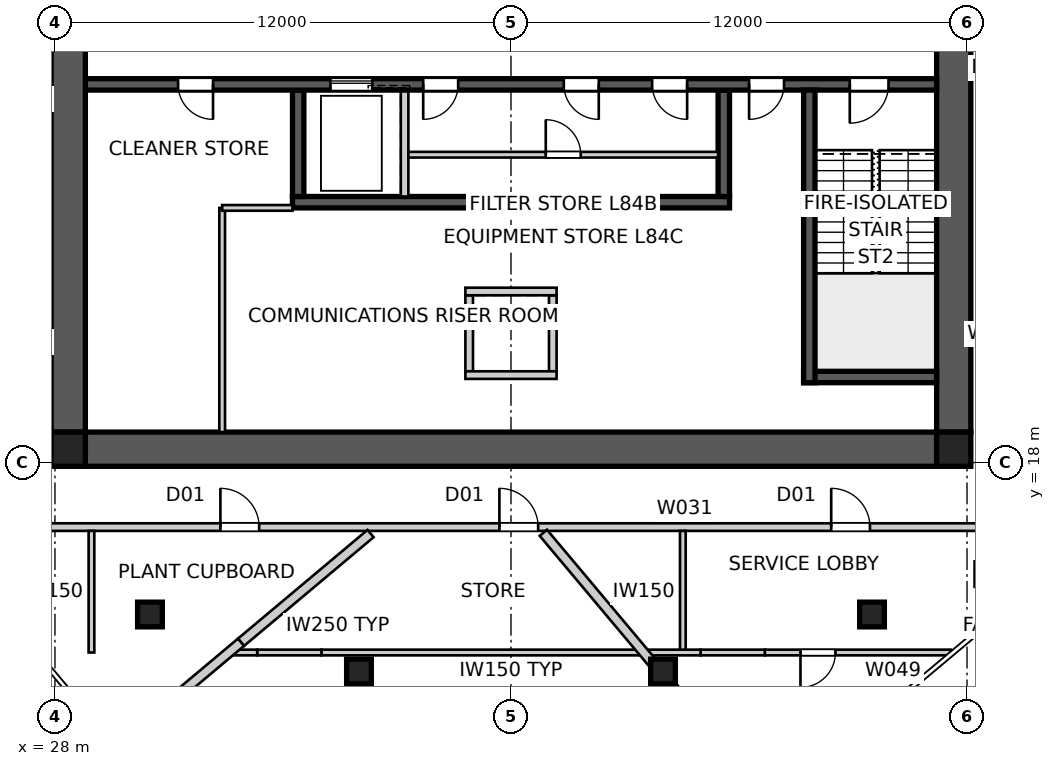
"""IFC4 building model, lengths in metres.
Left out: names, types, materials, properties, quantities, classifications, styles, units other than length and angle.
Written with IfcOpenShell. Run it as: python <this file> out.ifc"""

import sys

from ifc_helpers import new_model, si_unit, direction, frame, frame_2d, origin, origin_2d, place, context, subcontext, project, spatial, polyline, rectangle, outline, extrude, element, fill, save


model = new_model("IFC4")
c1 = context("Model", 3, precision=1e-05, world=origin(), true_north=direction((0.0, 1.0)))
c2 = subcontext(c1, "Body", "Model", "MODEL_VIEW")
j1 = project(units=[si_unit("LENGTHUNIT", "METRE"), si_unit("PLANEANGLEUNIT", "RADIAN")], contexts=[c1])
p1 = place(None, origin())
s1 = spatial("IfcSite", under=j1, at=p1, CompositionType="ELEMENT")
p2 = place(p1, origin())
s2 = spatial("IfcBuilding", under=s1, at=p2, CompositionType="ELEMENT")
p3 = place(p2, frame((0.0, 0.0, 304.3)))
s3 = spatial("IfcBuildingStorey", under=s2, at=p3, CompositionType="ELEMENT", Elevation=304.3)
p4 = place(p3, frame((51.2, 18.35, 0.0), z_axis=(0.0, 0.0, 1.0), x_axis=(-1.0, 0.0, 0.0)))
e1 = element("IfcWall", 1, at=p4, inside=s3, PredefinedType="SHEAR", context=c2, shape_type="SweptSolid", body=[
    extrude(outline(polyline([(0.0, -0.45), (22.4, -0.45), (22.4, -0.025), (22.85, -0.025), (22.85, 0.025), (22.4, 0.025), (22.4, 0.45), (0.0, 0.45), (0.0, 0.025), (-0.45, 0.025), (-0.45, -0.025), (0.0, -0.025), (0.0, -0.45)])), origin(), (0.0, 0.0, 1.0), 4.5),
])
p5 = place(p3, frame((51.65, 18.8, 0.0), z_axis=(0.0, 0.0, 1.0), x_axis=(0.0, 1.0, 0.0)))
e2 = element("IfcWall", 2, at=p5, inside=s3, PredefinedType="SHEAR", context=c2, shape_type="SweptSolid", body=[
    extrude(outline(polyline([(0.0, -0.45), (22.4, -0.45), (22.4, -0.025), (22.85, -0.025), (22.85, 0.025), (22.4, 0.025), (22.4, 0.45), (0.0, 0.45), (0.0, 0.025), (-0.45, 0.025), (-0.45, -0.025), (0.0, -0.025), (0.0, -0.45)])), origin(), (0.0, 0.0, 1.0), 4.5),
])
p6 = place(p5, frame((11.14, 0.0, 0.0)))
e3 = element("IfcOpeningElement", 3, at=p6, cuts=e2, PredefinedType="OPENING", context=c2, shape_type="SweptSolid", body=[
    extrude(rectangle(XDim=1.02, YDim=2.4, at=frame_2d((0.51, 1.2))), frame((0.0, 0.46, 0.0), z_axis=(0.0, -1.0, 0.0), x_axis=(1.0, 0.0, 0.0)), (0.0, 0.0, 1.0), 0.92),
])
p7 = place(p3, frame((28.35, 41.2, 0.0), z_axis=(0.0, 0.0, 1.0), x_axis=(0.0, -1.0, 0.0)))
e4 = element("IfcWall", 4, at=p7, inside=s3, PredefinedType="SHEAR", context=c2, shape_type="SweptSolid", body=[
    extrude(outline(polyline([(0.0, -0.45), (22.4, -0.45), (22.4, -0.025), (22.85, -0.025), (22.85, 0.025), (22.4, 0.025), (22.4, 0.45), (0.0, 0.45), (0.0, 0.025), (-0.45, 0.025), (-0.45, -0.025), (0.0, -0.025), (0.0, -0.45)])), origin(), (0.0, 0.0, 1.0), 4.5),
])
p8 = place(p7, frame((11.14, 0.0, 0.0)))
e5 = element("IfcOpeningElement", 5, at=p8, cuts=e4, PredefinedType="OPENING", context=c2, shape_type="SweptSolid", body=[
    extrude(rectangle(XDim=1.02, YDim=2.4, at=frame_2d((0.51, 1.2))), frame((0.0, 0.46, 0.0), z_axis=(0.0, -1.0, 0.0), x_axis=(1.0, 0.0, 0.0)), (0.0, 0.0, 1.0), 0.92),
])
p9 = place(p3, frame((51.2, 27.95, 0.0), z_axis=(0.0, 0.0, 1.0), x_axis=(-1.0, 0.0, 0.0)))
e6 = element("IfcWall", 6, at=p9, inside=s3, PredefinedType="SHEAR", context=c2, shape_type="SweptSolid", body=[
    extrude(rectangle(XDim=22.4, YDim=0.3, at=frame_2d((11.2, 0.0))), origin(), (0.0, 0.0, 1.0), 4.5),
])
p10 = place(p9, frame((19.04, 0.0, 0.0)))
e7 = element("IfcOpeningElement", 7, at=p10, cuts=e6, PredefinedType="OPENING", context=c2, shape_type="SweptSolid", body=[
    extrude(rectangle(XDim=0.92, YDim=2.1, at=frame_2d((0.46, 1.05))), frame((0.0, 0.16, 0.0), z_axis=(0.0, -1.0, 0.0), x_axis=(1.0, 0.0, 0.0)), (0.0, 0.0, 1.0), 0.32),
])
p11 = place(p9, frame((1.265, 0.0, 0.0)))
e8 = element("IfcOpeningElement", 8, at=p11, cuts=e6, PredefinedType="OPENING", context=c2, shape_type="SweptSolid", body=[
    extrude(rectangle(XDim=1.02, YDim=2.1, at=frame_2d((0.51, 1.05))), frame((0.0, 0.16, 0.0), z_axis=(0.0, -1.0, 0.0), x_axis=(1.0, 0.0, 0.0)), (0.0, 0.0, 1.0), 0.32),
])
p12 = place(p9, frame((4.015, 0.0, 0.0)))
e9 = element("IfcOpeningElement", 9, at=p12, cuts=e6, PredefinedType="OPENING", context=c2, shape_type="SweptSolid", body=[
    extrude(rectangle(XDim=0.92, YDim=2.1, at=frame_2d((0.46, 1.05))), frame((0.0, 0.16, 0.0), z_axis=(0.0, -1.0, 0.0), x_axis=(1.0, 0.0, 0.0)), (0.0, 0.0, 1.0), 0.32),
])
p13 = place(p9, frame((12.59, 0.0, 0.0)))
e10 = element("IfcOpeningElement", 10, at=p13, cuts=e6, PredefinedType="OPENING", context=c2, shape_type="SweptSolid", body=[
    extrude(rectangle(XDim=0.92, YDim=2.1, at=frame_2d((0.46, 1.05))), frame((0.0, 0.16, 0.0), z_axis=(0.0, -1.0, 0.0), x_axis=(1.0, 0.0, 0.0)), (0.0, 0.0, 1.0), 0.32),
])
p14 = place(p9, frame((8.89, 0.0, 0.0)))
e11 = element("IfcOpeningElement", 11, at=p14, cuts=e6, PredefinedType="OPENING", context=c2, shape_type="SweptSolid", body=[
    extrude(rectangle(XDim=0.92, YDim=2.1, at=frame_2d((0.46, 1.05))), frame((0.0, 0.16, 0.0), z_axis=(0.0, -1.0, 0.0), x_axis=(1.0, 0.0, 0.0)), (0.0, 0.0, 1.0), 0.32),
])
p15 = place(p9, frame((6.565, 0.0, 0.0)))
e12 = element("IfcOpeningElement", 12, at=p15, cuts=e6, PredefinedType="OPENING", context=c2, shape_type="SweptSolid", body=[
    extrude(rectangle(XDim=0.92, YDim=2.1, at=frame_2d((0.46, 1.05))), frame((0.0, 0.16, 0.0), z_axis=(0.0, -1.0, 0.0), x_axis=(1.0, 0.0, 0.0)), (0.0, 0.0, 1.0), 0.32),
])
p16 = place(p9, frame((14.85, 0.0, 0.0)))
e13 = element("IfcOpeningElement", 13, at=p16, cuts=e6, PredefinedType="OPENING", context=c2, shape_type="SweptSolid", body=[
    extrude(rectangle(XDim=1.1, YDim=2.1, at=frame_2d((0.55, 1.05))), frame((0.0, 0.16, 0.0), z_axis=(0.0, -1.0, 0.0), x_axis=(1.0, 0.0, 0.0)), (0.0, 0.0, 1.0), 0.32),
])
p17 = place(p3, frame((45.75, 24.85, 0.0), z_axis=(0.0, 0.0, 1.0), x_axis=(-1.0, 0.0, 0.0)))
e14 = element("IfcWall", 14, at=p17, inside=s3, PredefinedType="SHEAR", context=c2, shape_type="SweptSolid", body=[
    extrude(rectangle(XDim=11.5, YDim=0.3, at=frame_2d((5.75, 0.0))), origin(), (0.0, 0.0, 1.0), 4.5),
])
p18 = place(p3, frame((45.6, 27.8, 0.0), z_axis=(0.0, 0.0, 1.0), x_axis=(0.0, -1.0, 0.0)))
e15 = element("IfcWall", 15, at=p18, inside=s3, PredefinedType="SHEAR", context=c2, shape_type="SweptSolid", body=[
    extrude(rectangle(XDim=2.8, YDim=0.3, at=frame_2d((1.4, 0.0))), origin(), (0.0, 0.0, 1.0), 4.5),
])
p19 = place(p3, frame((37.2, 27.8, 0.0), z_axis=(0.0, 0.0, 1.0), x_axis=(0.0, -1.0, 0.0)))
e16 = element("IfcWall", 16, at=p19, inside=s3, PredefinedType="SOLIDWALL", context=c2, shape_type="SweptSolid", body=[
    extrude(rectangle(XDim=2.8, YDim=0.2, at=frame_2d((1.4, 0.0))), origin(), (0.0, 0.0, 1.0), 4.5),
])
p20 = place(p3, frame((34.4, 27.8, 0.0), z_axis=(0.0, 0.0, 1.0), x_axis=(0.0, -1.0, 0.0)))
e17 = element("IfcWall", 17, at=p20, inside=s3, PredefinedType="SHEAR", context=c2, shape_type="SweptSolid", body=[
    extrude(rectangle(XDim=2.8, YDim=0.3, at=frame_2d((1.4, 0.0))), origin(), (0.0, 0.0, 1.0), 4.5),
])
p21 = place(p3, frame((47.85, 27.8, 0.0), z_axis=(0.0, 0.0, 1.0), x_axis=(0.0, -1.0, 0.0)))
e18 = element("IfcWall", 18, at=p21, inside=s3, PredefinedType="SHEAR", context=c2, shape_type="SweptSolid", body=[
    extrude(rectangle(XDim=7.7, YDim=0.3, at=frame_2d((3.85, 0.0))), origin(), (0.0, 0.0, 1.0), 4.5),
])
p22 = place(p3, frame((51.2, 20.25, 0.0), z_axis=(0.0, 0.0, 1.0), x_axis=(-1.0, 0.0, 0.0)))
e19 = element("IfcWall", 19, at=p22, inside=s3, PredefinedType="SHEAR", context=c2, shape_type="SweptSolid", body=[
    extrude(rectangle(XDim=3.5, YDim=0.3, at=frame_2d((1.75, 0.0))), origin(), (0.0, 0.0, 1.0), 4.5),
])
for number, where, z_axis, x_axis in (
    (20, (38.9, 22.4, 0.0), (0.0, 0.0, 1.0), (0.0, -1.0, 0.0)),
    (21, (41.1, 22.4, 0.0), (0.0, 0.0, 1.0), (0.0, -1.0, 0.0)),
):
    element("IfcWall", number, at=place(p3, frame(where, z_axis=z_axis, x_axis=x_axis)), inside=s3, PredefinedType="SOLIDWALL", context=c2, shape_type="SweptSolid", body=[
        extrude(rectangle(XDim=2.0, YDim=0.2, at=frame_2d((1.0, 0.0))), origin(), (0.0, 0.0, 1.0), 4.5),
    ])
for number, where, z_axis, x_axis in (
    (22, (38.8, 22.5, 0.0), (0.0, 0.0, 1.0), (1.0, 0.0, 0.0)),
    (23, (38.8, 20.3, 0.0), (0.0, 0.0, 1.0), (1.0, 0.0, 0.0)),
):
    element("IfcWall", number, at=place(p3, frame(where, z_axis=z_axis, x_axis=x_axis)), inside=s3, PredefinedType="SOLIDWALL", context=c2, shape_type="SweptSolid", body=[
        extrude(rectangle(XDim=2.4, YDim=0.2, at=frame_2d((1.2, 0.0))), origin(), (0.0, 0.0, 1.0), 4.5),
    ])
for number, where, z_axis, x_axis in (
    (24, (28.35, 18.35, 0.0), (0.0, 0.0, 1.0), (1.0, 0.0, 0.0)),
    (25, (51.65, 18.35, 0.0), (0.0, 0.0, 1.0), (1.0, 0.0, 0.0)),
):
    element("IfcColumn", number, at=place(p3, frame(where, z_axis=z_axis, x_axis=x_axis)), inside=s3, PredefinedType="COLUMN", context=c2, shape_type="SweptSolid", body=[
        extrude(rectangle(XDim=0.9, YDim=0.9, at=origin_2d()), origin(), (0.0, 0.0, 1.0), 4.5),
    ])
for number, where, z_axis, x_axis in (
    (26, (30.5, 14.0, 0.0), (0.0, 0.0, 1.0), (1.0, 0.0, 0.0)),
    (27, (36.0, 12.5, 0.0), (0.0, 0.0, 1.0), (1.0, 0.0, 0.0)),
    (28, (44.0, 12.5, 0.0), (0.0, 0.0, 1.0), (1.0, 0.0, 0.0)),
    (29, (49.5, 14.0, 0.0), (0.0, 0.0, 1.0), (1.0, 0.0, 0.0)),
):
    element("IfcColumn", number, at=place(p3, frame(where, z_axis=z_axis, x_axis=x_axis)), inside=s3, PredefinedType="COLUMN", context=c2, shape_type="SweptSolid", body=[
        extrude(rectangle(XDim=0.65, YDim=0.65, at=origin_2d()), origin(), (0.0, 0.0, 1.0), 4.5),
    ])
p23 = place(p3, frame((26.3, 16.3, 0.0), z_axis=(0.0, 0.0, 1.0), x_axis=(1.0, 0.0, 0.0)))
e30 = element("IfcWall", 30, at=p23, inside=s3, PredefinedType="PARTITIONING", context=c2, shape_type="SweptSolid", body=[
    extrude(rectangle(XDim=27.4, YDim=0.2, at=frame_2d((13.7, 0.0))), origin(), (0.0, 0.0, 1.0), 4.25),
])
p24 = place(p23, frame((22.126, 0.0, 0.0)))
e31 = element("IfcOpeningElement", 31, at=p24, cuts=e30, PredefinedType="OPENING", context=c2, shape_type="SweptSolid", body=[
    extrude(rectangle(XDim=1.02, YDim=2.34, at=frame_2d((0.51, 1.17))), frame((0.0, 0.11, 0.0), z_axis=(0.0, -1.0, 0.0), x_axis=(1.0, 0.0, 0.0)), (0.0, 0.0, 1.0), 0.22),
])
p25 = place(p23, frame((13.395, 0.0, 0.0)))
e32 = element("IfcOpeningElement", 32, at=p25, cuts=e30, PredefinedType="OPENING", context=c2, shape_type="SweptSolid", body=[
    extrude(rectangle(XDim=1.02, YDim=2.34, at=frame_2d((0.51, 1.17))), frame((0.0, 0.11, 0.0), z_axis=(0.0, -1.0, 0.0), x_axis=(1.0, 0.0, 0.0)), (0.0, 0.0, 1.0), 0.22),
])
p26 = place(p23, frame((6.053, 0.0, 0.0)))
e33 = element("IfcOpeningElement", 33, at=p26, cuts=e30, PredefinedType="OPENING", context=c2, shape_type="SweptSolid", body=[
    extrude(rectangle(XDim=1.02, YDim=2.34, at=frame_2d((0.51, 1.17))), frame((0.0, 0.11, 0.0), z_axis=(0.0, -1.0, 0.0), x_axis=(1.0, 0.0, 0.0)), (0.0, 0.0, 1.0), 0.22),
])
p27 = place(p3, frame((46.857, 8.993, 0.0), z_axis=(0.0, 0.0, 1.0), x_axis=(-0.64278692291, 0.766045019392, 0.0)))
e34 = element("IfcWall", 34, at=p27, inside=s3, PredefinedType="PARTITIONING", context=c2, shape_type="SweptSolid", body=[
    extrude(rectangle(XDim=9.343, YDim=0.25, at=frame_2d((4.671, 0.0))), origin(), (0.0, 0.0, 1.0), 4.25),
])
p28 = place(p3, frame((30.365, 11.146, 0.0), z_axis=(0.0, 0.0, 1.0), x_axis=(0.766014492995, 0.642823301165, 0.0)))
e35 = element("IfcWall", 35, at=p28, inside=s3, PredefinedType="PARTITIONING", context=c2, shape_type="SweptSolid", body=[
    extrude(rectangle(XDim=3.308, YDim=0.25, at=frame_2d((1.654, 0.0))), origin(), (0.0, 0.0, 1.0), 3.638),
])
p29 = place(p3, frame((32.899, 13.272, 0.0), z_axis=(0.0, 0.0, 1.0), x_axis=(0.766051985436, 0.642778620996, 0.0)))
e36 = element("IfcWall", 36, at=p29, inside=s3, PredefinedType="PARTITIONING", context=c2, shape_type="SweptSolid", body=[
    extrude(rectangle(XDim=4.446, YDim=0.25, at=frame_2d((2.223, 0.0))), origin(), (0.0, 0.0, 1.0), 4.25),
])
p30 = place(p3, frame((32.4, 18.8, 0.0), z_axis=(0.0, 0.0, 1.0), x_axis=(0.0, 1.0, 0.0)))
e37 = element("IfcWall", 37, at=p30, inside=s3, PredefinedType="SOLIDWALL", context=c2, shape_type="SweptSolid", body=[
    extrude(rectangle(XDim=5.9, YDim=0.15, at=frame_2d((2.95, 0.0))), origin(), (0.0, 0.0, 1.0), 4.25),
])
p31 = place(p3, frame((32.4, 24.7, 0.0), z_axis=(0.0, 0.0, 1.0), x_axis=(1.0, 0.0, 0.0)))
e38 = element("IfcWall", 38, at=p31, inside=s3, PredefinedType="SOLIDWALL", context=c2, shape_type="SweptSolid", body=[
    extrude(rectangle(XDim=1.85, YDim=0.15, at=frame_2d((0.925, 0.0))), origin(), (0.0, 0.0, 1.0), 4.25),
])
for number, where, z_axis, x_axis in (
    (39, (28.961, 16.2, 0.0), (0.0, 0.0, 1.0), (0.0, -1.0, 0.0)),
    (40, (44.522, 13.0, 0.0), (0.0, 0.0, 1.0), (0.0, 1.0, 0.0)),
):
    element("IfcWall", number, at=place(p3, frame(where, z_axis=z_axis, x_axis=x_axis)), inside=s3, PredefinedType="SOLIDWALL", context=c2, shape_type="SweptSolid", body=[
        extrude(rectangle(XDim=3.2, YDim=0.15, at=frame_2d((1.6, 0.0))), origin(), (0.0, 0.0, 1.0), 4.25),
    ])
p32 = place(p3, frame((51.57, 13.0, 0.0), z_axis=(0.0, 0.0, 1.0), x_axis=(-1.0, 0.0, 0.0)))
e41 = element("IfcWall", 41, at=p32, inside=s3, PredefinedType="SOLIDWALL", context=c2, shape_type="SweptSolid", body=[
    extrude(rectangle(XDim=4.892, YDim=0.15, at=frame_2d((2.446, 0.0))), origin(), (0.0, 0.0, 1.0), 4.25),
])
p33 = place(p32, frame((3.033, 0.0, 0.0)))
e42 = element("IfcOpeningElement", 42, at=p33, cuts=e41, PredefinedType="OPENING", context=c2, shape_type="SweptSolid", body=[
    extrude(rectangle(XDim=0.92, YDim=2.1, at=frame_2d((0.46, 1.05))), frame((0.0, 0.085, 0.0), z_axis=(0.0, -1.0, 0.0), x_axis=(1.0, 0.0, 0.0)), (0.0, 0.0, 1.0), 0.17),
])
p34 = place(p3, frame((46.678, 13.0, 0.0), z_axis=(0.0, 0.0, 1.0), x_axis=(-1.0, 0.0, 0.0)))
e43 = element("IfcWall", 43, at=p34, inside=s3, PredefinedType="SOLIDWALL", context=c2, shape_type="SweptSolid", body=[
    extrude(rectangle(XDim=1.69, YDim=0.15, at=frame_2d((0.845, 0.0))), origin(), (0.0, 0.0, 1.0), 3.25),
])
p35 = place(p3, frame((44.988, 13.0, 0.0), z_axis=(0.0, 0.0, 1.0), x_axis=(-1.0, 0.0, 0.0)))
e44 = element("IfcWall", 44, at=p35, inside=s3, PredefinedType="SOLIDWALL", context=c2, shape_type="SweptSolid", body=[
    extrude(rectangle(XDim=9.977, YDim=0.15, at=frame_2d((4.988, 0.0))), origin(), (0.0, 0.0, 1.0), 4.25),
])
p36 = place(p3, frame((35.012, 13.0, 0.0), z_axis=(0.0, 0.0, 1.0), x_axis=(-1.0, 0.0, 0.0)))
e45 = element("IfcWall", 45, at=p36, inside=s3, PredefinedType="SOLIDWALL", context=c2, shape_type="SweptSolid", body=[
    extrude(rectangle(XDim=1.69, YDim=0.15, at=frame_2d((0.845, 0.0))), origin(), (0.0, 0.0, 1.0), 3.25),
])
p37 = place(p3, frame((33.322, 13.0, 0.0), z_axis=(0.0, 0.0, 1.0), x_axis=(-1.0, 0.0, 0.0)))
e46 = element("IfcWall", 46, at=p37, inside=s3, PredefinedType="SOLIDWALL", context=c2, shape_type="SweptSolid", body=[
    extrude(rectangle(XDim=0.747, YDim=0.15, at=frame_2d((0.373, 0.0))), origin(), (0.0, 0.0, 1.0), 4.25),
])
p38 = place(p3, frame((37.3, 26.1, 0.0), z_axis=(0.0, 0.0, 1.0), x_axis=(1.0, 0.0, 0.0)))
e47 = element("IfcWall", 47, at=p38, inside=s3, PredefinedType="SOLIDWALL", context=c2, shape_type="SweptSolid", body=[
    extrude(rectangle(XDim=8.15, YDim=0.15, at=frame_2d((4.075, 0.0))), origin(), (0.0, 0.0, 1.0), 4.25),
])
p39 = place(p38, frame((3.615, 0.0, 0.0)))
e48 = element("IfcOpeningElement", 48, at=p39, cuts=e47, PredefinedType="OPENING", context=c2, shape_type="SweptSolid", body=[
    extrude(rectangle(XDim=0.92, YDim=2.1, at=frame_2d((0.46, 1.05))), frame((0.0, 0.085, 0.0), z_axis=(0.0, -1.0, 0.0), x_axis=(1.0, 0.0, 0.0)), (0.0, 0.0, 1.0), 0.17),
])
p40 = place(p10, origin())
e49 = element("IfcDoor", 49, at=p40, inside=s3, OperationType="SINGLE_SWING_LEFT", PredefinedType="DOOR", context=c2, shape_type="SweptSolid", body=[
    extrude(rectangle(XDim=0.92, YDim=2.1, at=frame_2d((0.46, 1.05))), frame((0.0, 0.025, 0.0), z_axis=(0.0, -1.0, 0.0), x_axis=(1.0, 0.0, 0.0)), (0.0, 0.0, 1.0), 0.05),
])
fill(e7, e49)
p41 = place(p11, origin())
e50 = element("IfcDoor", 50, at=p41, inside=s3, OperationType="SINGLE_SWING_RIGHT", PredefinedType="DOOR", context=c2, shape_type="SweptSolid", body=[
    extrude(rectangle(XDim=1.02, YDim=2.1, at=frame_2d((0.51, 1.05))), frame((0.0, 0.025, 0.0), z_axis=(0.0, -1.0, 0.0), x_axis=(1.0, 0.0, 0.0)), (0.0, 0.0, 1.0), 0.05),
])
fill(e8, e50)
p42 = place(p12, origin())
e51 = element("IfcDoor", 51, at=p42, inside=s3, OperationType="SINGLE_SWING_RIGHT", PredefinedType="DOOR", context=c2, shape_type="SweptSolid", body=[
    extrude(rectangle(XDim=0.92, YDim=2.1, at=frame_2d((0.46, 1.05))), frame((0.0, 0.025, 0.0), z_axis=(0.0, -1.0, 0.0), x_axis=(1.0, 0.0, 0.0)), (0.0, 0.0, 1.0), 0.05),
])
fill(e9, e51)
p43 = place(p24, origin())
e52 = element("IfcDoor", 52, at=p43, inside=s3, OperationType="SINGLE_SWING_LEFT", PredefinedType="DOOR", context=c2, shape_type="SweptSolid", body=[
    extrude(rectangle(XDim=1.02, YDim=2.34, at=frame_2d((0.51, 1.17))), frame((0.0, 0.025, 0.0), z_axis=(0.0, -1.0, 0.0), x_axis=(1.0, 0.0, 0.0)), (0.0, 0.0, 1.0), 0.05),
])
fill(e31, e52)
p44 = place(p25, origin())
e53 = element("IfcDoor", 53, at=p44, inside=s3, OperationType="SINGLE_SWING_LEFT", PredefinedType="DOOR", context=c2, shape_type="SweptSolid", body=[
    extrude(rectangle(XDim=1.02, YDim=2.34, at=frame_2d((0.51, 1.17))), frame((0.0, 0.025, 0.0), z_axis=(0.0, -1.0, 0.0), x_axis=(1.0, 0.0, 0.0)), (0.0, 0.0, 1.0), 0.05),
])
fill(e32, e53)
p45 = place(p26, origin())
e54 = element("IfcDoor", 54, at=p45, inside=s3, OperationType="SINGLE_SWING_LEFT", PredefinedType="DOOR", context=c2, shape_type="SweptSolid", body=[
    extrude(rectangle(XDim=1.02, YDim=2.34, at=frame_2d((0.51, 1.17))), frame((0.0, 0.025, 0.0), z_axis=(0.0, -1.0, 0.0), x_axis=(1.0, 0.0, 0.0)), (0.0, 0.0, 1.0), 0.05),
])
fill(e33, e54)
p46 = place(p33, origin())
e55 = element("IfcDoor", 55, at=p46, inside=s3, OperationType="SINGLE_SWING_RIGHT", PredefinedType="DOOR", context=c2, shape_type="SweptSolid", body=[
    extrude(rectangle(XDim=0.92, YDim=2.1, at=frame_2d((0.46, 1.05))), frame((0.0, 0.025, 0.0), z_axis=(0.0, -1.0, 0.0), x_axis=(1.0, 0.0, 0.0)), (0.0, 0.0, 1.0), 0.05),
])
fill(e42, e55)
p47 = place(p13, origin())
e56 = element("IfcDoor", 56, at=p47, inside=s3, OperationType="SINGLE_SWING_RIGHT", PredefinedType="DOOR", context=c2, shape_type="SweptSolid", body=[
    extrude(rectangle(XDim=0.92, YDim=2.1, at=frame_2d((0.46, 1.05))), frame((0.0, 0.025, 0.0), z_axis=(0.0, -1.0, 0.0), x_axis=(1.0, 0.0, 0.0)), (0.0, 0.0, 1.0), 0.05),
])
fill(e10, e56)
p48 = place(p14, origin())
e57 = element("IfcDoor", 57, at=p48, inside=s3, OperationType="SINGLE_SWING_LEFT", PredefinedType="DOOR", context=c2, shape_type="SweptSolid", body=[
    extrude(rectangle(XDim=0.92, YDim=2.1, at=frame_2d((0.46, 1.05))), frame((0.0, 0.025, 0.0), z_axis=(0.0, -1.0, 0.0), x_axis=(1.0, 0.0, 0.0)), (0.0, 0.0, 1.0), 0.05),
])
fill(e11, e57)
p49 = place(p15, origin())
e58 = element("IfcDoor", 58, at=p49, inside=s3, OperationType="SINGLE_SWING_LEFT", PredefinedType="DOOR", context=c2, shape_type="SweptSolid", body=[
    extrude(rectangle(XDim=0.92, YDim=2.1, at=frame_2d((0.46, 1.05))), frame((0.0, 0.025, 0.0), z_axis=(0.0, -1.0, 0.0), x_axis=(1.0, 0.0, 0.0)), (0.0, 0.0, 1.0), 0.05),
])
fill(e12, e58)
p50 = place(p39, origin())
e59 = element("IfcDoor", 59, at=p50, inside=s3, OperationType="SINGLE_SWING_LEFT", PredefinedType="DOOR", context=c2, shape_type="SweptSolid", body=[
    extrude(rectangle(XDim=0.92, YDim=2.1, at=frame_2d((0.46, 1.05))), frame((0.0, 0.025, 0.0), z_axis=(0.0, -1.0, 0.0), x_axis=(1.0, 0.0, 0.0)), (0.0, 0.0, 1.0), 0.05),
])
fill(e48, e59)
p51 = place(p16, origin())
e60 = element("IfcDoor", 60, at=p51, inside=s3, OperationType="SLIDING_TO_LEFT", PredefinedType="DOOR", context=c2, shape_type="SweptSolid", body=[
    extrude(rectangle(XDim=1.1, YDim=2.1, at=frame_2d((0.55, 1.05))), frame((0.0, 0.025, 0.0), z_axis=(0.0, -1.0, 0.0), x_axis=(1.0, 0.0, 0.0)), (0.0, 0.0, 1.0), 0.05),
])
fill(e13, e60)
save(model, sys.argv[1])
